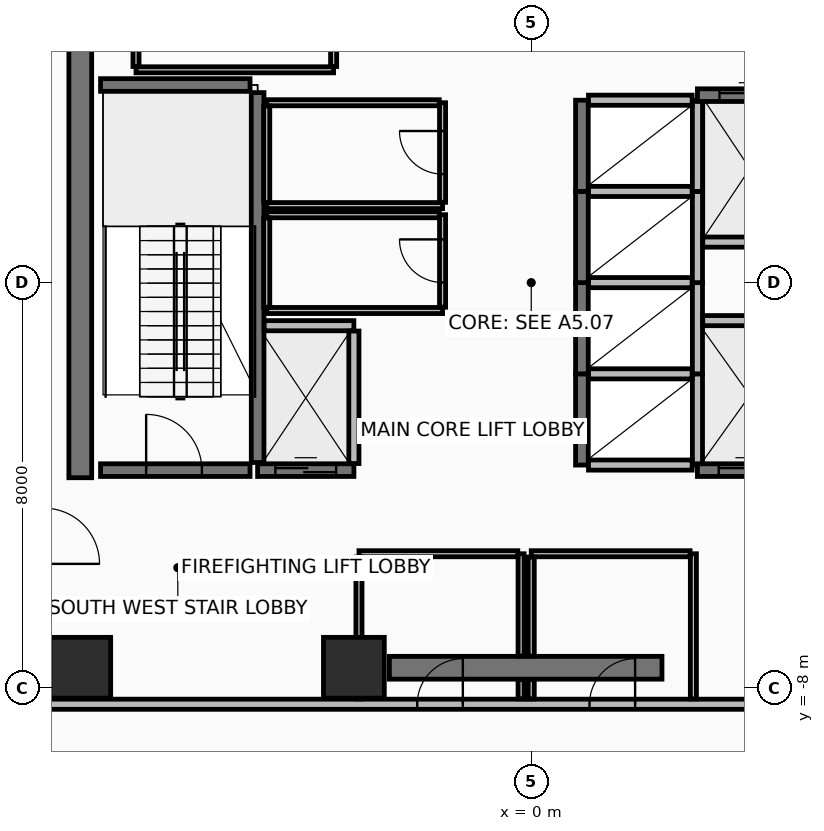
"""IFC4 building model, lengths in metres.
Left out: names, types, materials, properties, quantities, classifications, styles, units other than length and angle.
Written with IfcOpenShell. Run it as: python <this file> out.ifc"""

import sys

from ifc_helpers import new_model, si_unit, direction, frame, frame_2d, origin, origin_2d, place, context, subcontext, project, spatial, rectangle, extrude, element, fill, save


model = new_model("IFC4")
c1 = context("Model", 3, precision=1e-05, world=origin(), true_north=direction((0.0, 1.0)))
c2 = subcontext(c1, "Body", "Model", "MODEL_VIEW")
j1 = project(units=[si_unit("LENGTHUNIT", "METRE"), si_unit("PLANEANGLEUNIT", "RADIAN")], contexts=[c1])
p1 = place(None, origin())
s1 = spatial("IfcSite", under=j1, at=p1, CompositionType="ELEMENT")
p2 = place(p1, origin())
s2 = spatial("IfcBuilding", under=s1, at=p2, CompositionType="ELEMENT")
p3 = place(p2, frame((0.0, 0.0, 134.05)))
s3 = spatial("IfcBuildingStorey", under=s2, at=p3, CompositionType="ELEMENT", Elevation=134.05)
for number, where, z_axis, x_axis in (
    (1, (-8.9, -7.6, 0.0), (0.0, 0.0, 1.0), (1.0, 0.0, 0.0)),
    (2, (-3.5, -7.6, 0.0), (0.0, 0.0, 1.0), (1.0, 0.0, 0.0)),
):
    element("IfcColumn", number, at=place(p3, frame(where, z_axis=z_axis, x_axis=x_axis)), inside=s3, PredefinedType="COLUMN", context=c2, shape_type="SweptSolid", body=[
        extrude(rectangle(XDim=1.2, YDim=1.2, at=origin_2d()), origin(), (0.0, 0.0, 1.0), 4.75),
    ])
p4 = place(p3, frame((-2.8, -7.6, 0.0), z_axis=(0.0, 0.0, 1.0), x_axis=(1.0, 0.0, 0.0)))
e3 = element("IfcWall", 3, at=p4, inside=s3, PredefinedType="SHEAR", context=c2, shape_type="SweptSolid", body=[
    extrude(rectangle(XDim=5.38, YDim=0.45, at=frame_2d((2.69, 0.0))), origin(), (0.0, 0.0, 1.0), 4.56),
])
p5 = place(p3, frame((-8.9, -3.85, 0.0), z_axis=(0.0, 0.0, 1.0), x_axis=(0.0, 1.0, 0.0)))
e4 = element("IfcWall", 4, at=p5, inside=s3, PredefinedType="SHEAR", context=c2, shape_type="SweptSolid", body=[
    extrude(rectangle(XDim=10.7, YDim=0.45, at=frame_2d((5.35, 0.0))), origin(), (0.0, 0.0, 1.0), 4.56),
])
p6 = place(p3, frame((-9.62, -8.32, 0.0), z_axis=(0.0, 0.0, 1.0), x_axis=(1.0, 0.0, 0.0)))
e5 = element("IfcWall", 5, at=p6, inside=s3, PredefinedType="PARTITIONING", context=c2, shape_type="SweptSolid", body=[
    extrude(rectangle(XDim=19.24, YDim=0.2, at=frame_2d((9.62, 0.0))), origin(), (0.0, 0.0, 1.0), 2.355),
])
p7 = place(p6, frame((7.37, 0.0, 0.0)))
e6 = element("IfcOpeningElement", 6, at=p7, cuts=e5, PredefinedType="OPENING", context=c2, shape_type="SweptSolid", body=[
    extrude(rectangle(XDim=0.9, YDim=2.1, at=frame_2d((0.45, 1.05))), frame((0.0, 0.11, 0.0), z_axis=(0.0, -1.0, 0.0), x_axis=(1.0, 0.0, 0.0)), (0.0, 0.0, 1.0), 0.22),
])
p8 = place(p6, frame((10.77, 0.0, 0.0)))
e7 = element("IfcOpeningElement", 7, at=p8, cuts=e5, PredefinedType="OPENING", context=c2, shape_type="SweptSolid", body=[
    extrude(rectangle(XDim=0.9, YDim=2.1, at=frame_2d((0.45, 1.05))), frame((0.0, 0.11, 0.0), z_axis=(0.0, -1.0, 0.0), x_axis=(1.0, 0.0, 0.0)), (0.0, 0.0, 1.0), 0.22),
])
p9 = place(p3, frame((-5.4, -3.55, 0.0), z_axis=(0.0, 0.0, 1.0), x_axis=(0.0, 1.0, 0.0)))
e8 = element("IfcWall", 8, at=p9, inside=s3, PredefinedType="SHEAR", context=c2, shape_type="SweptSolid", body=[
    extrude(rectangle(XDim=7.3, YDim=0.25, at=frame_2d((3.65, 0.0))), origin(), (0.0, 0.0, 1.0), 4.56),
])
p10 = place(p3, frame((-8.5, -3.7, 0.0), z_axis=(0.0, 0.0, 1.0), x_axis=(1.0, 0.0, 0.0)))
e9 = element("IfcWall", 9, at=p10, inside=s3, PredefinedType="SHEAR", context=c2, shape_type="SweptSolid", body=[
    extrude(rectangle(XDim=2.95, YDim=0.25, at=frame_2d((1.475, 0.0))), origin(), (0.0, 0.0, 1.0), 4.56),
])
p11 = place(p10, frame((0.9, 0.0, 0.0)))
e10 = element("IfcOpeningElement", 10, at=p11, cuts=e9, PredefinedType="OPENING", context=c2, shape_type="SweptSolid", body=[
    extrude(rectangle(XDim=1.1, YDim=2.15, at=frame_2d((0.55, 1.075))), frame((0.0, 0.135, 0.0), z_axis=(0.0, -1.0, 0.0), x_axis=(1.0, 0.0, 0.0)), (0.0, 0.0, 1.0), 0.27),
])
p12 = place(p3, frame((-8.5, 3.9, 0.0), z_axis=(0.0, 0.0, 1.0), x_axis=(1.0, 0.0, 0.0)))
e11 = element("IfcWall", 11, at=p12, inside=s3, PredefinedType="SHEAR", context=c2, shape_type="SweptSolid", body=[
    extrude(rectangle(XDim=2.95, YDim=0.25, at=frame_2d((1.475, 0.0))), origin(), (0.0, 0.0, 1.0), 4.56),
])
p13 = place(p3, frame((1.0, -3.6, 0.0), z_axis=(0.0, 0.0, 1.0), x_axis=(0.0, 1.0, 0.0)))
e12 = element("IfcWall", 12, at=p13, inside=s3, PredefinedType="SHEAR", context=c2, shape_type="SweptSolid", body=[
    extrude(rectangle(XDim=1.8, YDim=0.25, at=frame_2d((0.9, 0.0))), origin(), (0.0, 0.0, 1.0), 4.56),
])
p14 = place(p3, frame((3.28, -3.6, 0.0), z_axis=(0.0, 0.0, 1.0), x_axis=(0.0, 1.0, 0.0)))
e13 = element("IfcWall", 13, at=p14, inside=s3, PredefinedType="PARTITIONING", context=c2, shape_type="SweptSolid", body=[
    extrude(rectangle(XDim=1.8, YDim=0.2, at=frame_2d((0.9, 0.0))), origin(), (0.0, 0.0, 1.0), 4.56),
])
for number, where, z_axis, x_axis in (
    (14, (1.13, -3.6, 0.0), (0.0, 0.0, 1.0), (1.0, 0.0, 0.0)),
    (15, (1.13, -1.8, 0.0), (0.0, 0.0, 1.0), (1.0, 0.0, 0.0)),
):
    element("IfcWall", number, at=place(p3, frame(where, z_axis=z_axis, x_axis=x_axis)), inside=s3, PredefinedType="PARTITIONING", context=c2, shape_type="SweptSolid", body=[
        extrude(rectangle(XDim=2.045, YDim=0.2, at=frame_2d((1.022, 0.0))), origin(), (0.0, 0.0, 1.0), 4.56),
    ])
p15 = place(p3, frame((1.0, -1.8, 0.0), z_axis=(0.0, 0.0, 1.0), x_axis=(0.0, 1.0, 0.0)))
e16 = element("IfcWall", 16, at=p15, inside=s3, PredefinedType="SHEAR", context=c2, shape_type="SweptSolid", body=[
    extrude(rectangle(XDim=1.8, YDim=0.25, at=frame_2d((0.9, 0.0))), origin(), (0.0, 0.0, 1.0), 4.56),
])
p16 = place(p3, frame((3.28, -1.8, 0.0), z_axis=(0.0, 0.0, 1.0), x_axis=(0.0, 1.0, 0.0)))
e17 = element("IfcWall", 17, at=p16, inside=s3, PredefinedType="PARTITIONING", context=c2, shape_type="SweptSolid", body=[
    extrude(rectangle(XDim=1.8, YDim=0.2, at=frame_2d((0.9, 0.0))), origin(), (0.0, 0.0, 1.0), 4.56),
])
p17 = place(p3, frame((1.13, 0.0, 0.0), z_axis=(0.0, 0.0, 1.0), x_axis=(1.0, 0.0, 0.0)))
e18 = element("IfcWall", 18, at=p17, inside=s3, PredefinedType="PARTITIONING", context=c2, shape_type="SweptSolid", body=[
    extrude(rectangle(XDim=2.045, YDim=0.2, at=frame_2d((1.022, 0.0))), origin(), (0.0, 0.0, 1.0), 4.56),
])
p18 = place(p3, frame((1.0, 0.0, 0.0), z_axis=(0.0, 0.0, 1.0), x_axis=(0.0, 1.0, 0.0)))
e19 = element("IfcWall", 19, at=p18, inside=s3, PredefinedType="SHEAR", context=c2, shape_type="SweptSolid", body=[
    extrude(rectangle(XDim=1.8, YDim=0.25, at=frame_2d((0.9, 0.0))), origin(), (0.0, 0.0, 1.0), 4.56),
])
p19 = place(p3, frame((3.28, 0.0, 0.0), z_axis=(0.0, 0.0, 1.0), x_axis=(0.0, 1.0, 0.0)))
e20 = element("IfcWall", 20, at=p19, inside=s3, PredefinedType="PARTITIONING", context=c2, shape_type="SweptSolid", body=[
    extrude(rectangle(XDim=1.8, YDim=0.2, at=frame_2d((0.9, 0.0))), origin(), (0.0, 0.0, 1.0), 4.56),
])
p20 = place(p3, frame((1.13, 1.8, 0.0), z_axis=(0.0, 0.0, 1.0), x_axis=(1.0, 0.0, 0.0)))
e21 = element("IfcWall", 21, at=p20, inside=s3, PredefinedType="PARTITIONING", context=c2, shape_type="SweptSolid", body=[
    extrude(rectangle(XDim=2.045, YDim=0.2, at=frame_2d((1.022, 0.0))), origin(), (0.0, 0.0, 1.0), 4.56),
])
p21 = place(p3, frame((1.0, 1.8, 0.0), z_axis=(0.0, 0.0, 1.0), x_axis=(0.0, 1.0, 0.0)))
e22 = element("IfcWall", 22, at=p21, inside=s3, PredefinedType="SHEAR", context=c2, shape_type="SweptSolid", body=[
    extrude(rectangle(XDim=1.8, YDim=0.25, at=frame_2d((0.9, 0.0))), origin(), (0.0, 0.0, 1.0), 4.56),
])
p22 = place(p3, frame((3.28, 1.8, 0.0), z_axis=(0.0, 0.0, 1.0), x_axis=(0.0, 1.0, 0.0)))
e23 = element("IfcWall", 23, at=p22, inside=s3, PredefinedType="PARTITIONING", context=c2, shape_type="SweptSolid", body=[
    extrude(rectangle(XDim=1.8, YDim=0.2, at=frame_2d((0.9, 0.0))), origin(), (0.0, 0.0, 1.0), 4.56),
])
p23 = place(p3, frame((1.13, 3.6, 0.0), z_axis=(0.0, 0.0, 1.0), x_axis=(1.0, 0.0, 0.0)))
e24 = element("IfcWall", 24, at=p23, inside=s3, PredefinedType="PARTITIONING", context=c2, shape_type="SweptSolid", body=[
    extrude(rectangle(XDim=2.045, YDim=0.2, at=frame_2d((1.022, 0.0))), origin(), (0.0, 0.0, 1.0), 3.755),
])
p24 = place(p3, frame((-5.4, -3.7, 0.0), z_axis=(0.0, 0.0, 1.0), x_axis=(1.0, 0.0, 0.0)))
e25 = element("IfcWall", 25, at=p24, inside=s3, PredefinedType="SHEAR", context=c2, shape_type="SweptSolid", body=[
    extrude(rectangle(XDim=1.9, YDim=0.25, at=frame_2d((0.95, 0.0))), origin(), (0.0, 0.0, 1.0), 4.56),
])
p25 = place(p24, frame((0.35, 0.0, 0.0)))
e26 = element("IfcOpeningElement", 26, at=p25, cuts=e25, PredefinedType="OPENING", context=c2, shape_type="SweptSolid", body=[
    extrude(rectangle(XDim=1.2, YDim=2.2, at=frame_2d((0.6, 1.1))), frame((0.0, 0.135, 0.0), z_axis=(0.0, -1.0, 0.0), x_axis=(1.0, 0.0, 0.0)), (0.0, 0.0, 1.0), 0.27),
])
p26 = place(p3, frame((-5.27, -0.85, 0.0), z_axis=(0.0, 0.0, 1.0), x_axis=(1.0, 0.0, 0.0)))
e27 = element("IfcWall", 27, at=p26, inside=s3, PredefinedType="PARTITIONING", context=c2, shape_type="SweptSolid", body=[
    extrude(rectangle(XDim=1.77, YDim=0.2, at=frame_2d((0.885, 0.0))), origin(), (0.0, 0.0, 1.0), 4.56),
])
p27 = place(p3, frame((-3.5, -3.57, 0.0), z_axis=(0.0, 0.0, 1.0), x_axis=(0.0, 1.0, 0.0)))
e28 = element("IfcWall", 28, at=p27, inside=s3, PredefinedType="PARTITIONING", context=c2, shape_type="SweptSolid", body=[
    extrude(rectangle(XDim=2.615, YDim=0.2, at=frame_2d((1.308, 0.0))), origin(), (0.0, 0.0, 1.0), 4.56),
])
p28 = place(p3, frame((3.28, 3.7, 0.0), z_axis=(0.0, 0.0, 1.0), x_axis=(1.0, 0.0, 0.0)))
e29 = element("IfcWall", 29, at=p28, inside=s3, PredefinedType="SHEAR", context=c2, shape_type="SweptSolid", body=[
    extrude(rectangle(XDim=2.07, YDim=0.25, at=frame_2d((1.035, 0.0))), origin(), (0.0, 0.0, 1.0), 4.56),
])
p29 = place(p28, frame((0.435, 0.0, 0.0)))
e30 = element("IfcOpeningElement", 30, at=p29, cuts=e29, PredefinedType="OPENING", context=c2, shape_type="SweptSolid", body=[
    extrude(rectangle(XDim=1.2, YDim=2.2, at=frame_2d((0.6, 1.1))), frame((0.0, 0.135, 0.0), z_axis=(0.0, -1.0, 0.0), x_axis=(1.0, 0.0, 0.0)), (0.0, 0.0, 1.0), 0.27),
])
p30 = place(p3, frame((3.385, 0.8, 0.0), z_axis=(0.0, 0.0, 1.0), x_axis=(1.0, 0.0, 0.0)))
e31 = element("IfcWall", 31, at=p30, inside=s3, PredefinedType="PARTITIONING", context=c2, shape_type="SweptSolid", body=[
    extrude(rectangle(XDim=1.835, YDim=0.2, at=frame_2d((0.917, 0.0))), origin(), (0.0, 0.0, 1.0), 4.56),
])
p31 = place(p3, frame((3.28, -3.7, 0.0), z_axis=(0.0, 0.0, 1.0), x_axis=(1.0, 0.0, 0.0)))
e32 = element("IfcWall", 32, at=p31, inside=s3, PredefinedType="SHEAR", context=c2, shape_type="SweptSolid", body=[
    extrude(rectangle(XDim=1.94, YDim=0.25, at=frame_2d((0.97, 0.0))), origin(), (0.0, 0.0, 1.0), 4.56),
])
p32 = place(p31, frame((0.42, 0.0, 0.0)))
e33 = element("IfcOpeningElement", 33, at=p32, cuts=e32, PredefinedType="OPENING", context=c2, shape_type="SweptSolid", body=[
    extrude(rectangle(XDim=1.1, YDim=2.2, at=frame_2d((0.55, 1.1))), frame((0.0, 0.135, 0.0), z_axis=(0.0, -1.0, 0.0), x_axis=(1.0, 0.0, 0.0)), (0.0, 0.0, 1.0), 0.27),
])
p33 = place(p3, frame((3.385, -0.75, 0.0), z_axis=(0.0, 0.0, 1.0), x_axis=(1.0, 0.0, 0.0)))
e34 = element("IfcWall", 34, at=p33, inside=s3, PredefinedType="PARTITIONING", context=c2, shape_type="SweptSolid", body=[
    extrude(rectangle(XDim=1.835, YDim=0.2, at=frame_2d((0.917, 0.0))), origin(), (0.0, 0.0, 1.0), 4.56),
])
p34 = place(p3, frame((-5.22, 1.52, 0.0), z_axis=(0.0, 0.0, 1.0), x_axis=(1.0, 0.0, 0.0)))
e35 = element("IfcWall", 35, at=p34, inside=s3, PredefinedType="PARTITIONING", context=c2, shape_type="SweptSolid", body=[
    extrude(rectangle(XDim=3.47, YDim=0.12, at=frame_2d((1.735, 0.0))), origin(), (0.0, 0.0, 1.0), 4.56),
])
p35 = place(p3, frame((-1.75, 1.585, 0.0), z_axis=(0.0, 0.0, 1.0), x_axis=(0.0, 1.0, 0.0)))
e36 = element("IfcWall", 36, at=p35, inside=s3, PredefinedType="PARTITIONING", context=c2, shape_type="SweptSolid", body=[
    extrude(rectangle(XDim=1.965, YDim=0.12, at=frame_2d((0.982, 0.0))), origin(), (0.0, 0.0, 1.0), 4.56),
])
p36 = place(p35, frame((0.557, 0.0, 0.0)))
e37 = element("IfcOpeningElement", 37, at=p36, cuts=e36, PredefinedType="OPENING", context=c2, shape_type="SweptSolid", body=[
    extrude(rectangle(XDim=0.85, YDim=2.1, at=frame_2d((0.425, 1.05))), frame((0.0, 0.07, 0.0), z_axis=(0.0, -1.0, 0.0), x_axis=(1.0, 0.0, 0.0)), (0.0, 0.0, 1.0), 0.14),
])
p37 = place(p3, frame((-1.815, 3.55, 0.0), z_axis=(0.0, 0.0, 1.0), x_axis=(-1.0, 0.0, 0.0)))
e38 = element("IfcWall", 38, at=p37, inside=s3, PredefinedType="PARTITIONING", context=c2, shape_type="SweptSolid", body=[
    extrude(rectangle(XDim=3.405, YDim=0.12, at=frame_2d((1.703, 0.0))), origin(), (0.0, 0.0, 1.0), 4.56),
])
p38 = place(p3, frame((-5.22, 3.485, 0.0), z_axis=(0.0, 0.0, 1.0), x_axis=(0.0, -1.0, 0.0)))
e39 = element("IfcWall", 39, at=p38, inside=s3, PredefinedType="PARTITIONING", context=c2, shape_type="SweptSolid", body=[
    extrude(rectangle(XDim=1.9, YDim=0.12, at=frame_2d((0.95, 0.0))), origin(), (0.0, 0.0, 1.0), 4.56),
])
p39 = place(p3, frame((-5.22, -0.55, 0.0), z_axis=(0.0, 0.0, 1.0), x_axis=(1.0, 0.0, 0.0)))
e40 = element("IfcWall", 40, at=p39, inside=s3, PredefinedType="PARTITIONING", context=c2, shape_type="SweptSolid", body=[
    extrude(rectangle(XDim=3.47, YDim=0.12, at=frame_2d((1.735, 0.0))), origin(), (0.0, 0.0, 1.0), 4.56),
])
p40 = place(p3, frame((-1.75, -0.485, 0.0), z_axis=(0.0, 0.0, 1.0), x_axis=(0.0, 1.0, 0.0)))
e41 = element("IfcWall", 41, at=p40, inside=s3, PredefinedType="PARTITIONING", context=c2, shape_type="SweptSolid", body=[
    extrude(rectangle(XDim=1.825, YDim=0.12, at=frame_2d((0.913, 0.0))), origin(), (0.0, 0.0, 1.0), 4.56),
])
p41 = place(p40, frame((0.488, 0.0, 0.0)))
e42 = element("IfcOpeningElement", 42, at=p41, cuts=e41, PredefinedType="OPENING", context=c2, shape_type="SweptSolid", body=[
    extrude(rectangle(XDim=0.85, YDim=2.1, at=frame_2d((0.425, 1.05))), frame((0.0, 0.07, 0.0), z_axis=(0.0, -1.0, 0.0), x_axis=(1.0, 0.0, 0.0)), (0.0, 0.0, 1.0), 0.14),
])
p42 = place(p3, frame((-1.815, 1.34, 0.0), z_axis=(0.0, 0.0, 1.0), x_axis=(-1.0, 0.0, 0.0)))
e43 = element("IfcWall", 43, at=p42, inside=s3, PredefinedType="PARTITIONING", context=c2, shape_type="SweptSolid", body=[
    extrude(rectangle(XDim=3.405, YDim=0.12, at=frame_2d((1.703, 0.0))), origin(), (0.0, 0.0, 1.0), 4.56),
])
p43 = place(p3, frame((-5.22, 1.275, 0.0), z_axis=(0.0, 0.0, 1.0), x_axis=(0.0, -1.0, 0.0)))
e44 = element("IfcWall", 44, at=p43, inside=s3, PredefinedType="PARTITIONING", context=c2, shape_type="SweptSolid", body=[
    extrude(rectangle(XDim=1.76, YDim=0.12, at=frame_2d((0.88, 0.0))), origin(), (0.0, 0.0, 1.0), 4.56),
])
p44 = place(p3, frame((-0.2, -8.215, 0.0), z_axis=(0.0, 0.0, 1.0), x_axis=(0.0, 1.0, 0.0)))
e45 = element("IfcWall", 45, at=p44, inside=s3, PredefinedType="PARTITIONING", context=c2, shape_type="SweptSolid", body=[
    extrude(rectangle(XDim=0.385, YDim=0.12, at=frame_2d((0.192, 0.0))), origin(), (0.0, 0.0, 1.0), 3.755),
])
p45 = place(p3, frame((-0.2, -7.37, 0.0), z_axis=(0.0, 0.0, 1.0), x_axis=(0.0, 1.0, 0.0)))
e46 = element("IfcWall", 46, at=p45, inside=s3, PredefinedType="PARTITIONING", context=c2, shape_type="SweptSolid", body=[
    extrude(rectangle(XDim=2.02, YDim=0.12, at=frame_2d((1.01, 0.0))), origin(), (0.0, 0.0, 1.0), 3.755),
])
p46 = place(p3, frame((-0.265, -5.35, 0.0), z_axis=(0.0, 0.0, 1.0), x_axis=(-1.0, 0.0, 0.0)))
e47 = element("IfcWall", 47, at=p46, inside=s3, PredefinedType="PARTITIONING", context=c2, shape_type="SweptSolid", body=[
    extrude(rectangle(XDim=3.135, YDim=0.12, at=frame_2d((1.567, 0.0))), origin(), (0.0, 0.0, 1.0), 3.755),
])
p47 = place(p3, frame((-3.4, -5.415, 0.0), z_axis=(0.0, 0.0, 1.0), x_axis=(0.0, -1.0, 0.0)))
e48 = element("IfcWall", 48, at=p47, inside=s3, PredefinedType="PARTITIONING", context=c2, shape_type="SweptSolid", body=[
    extrude(rectangle(XDim=2.8, YDim=0.12, at=frame_2d((1.4, 0.0))), origin(), (0.0, 0.0, 1.0), 2.355),
])
p48 = place(p3, frame((3.2, -8.215, 0.0), z_axis=(0.0, 0.0, 1.0), x_axis=(0.0, 1.0, 0.0)))
e49 = element("IfcWall", 49, at=p48, inside=s3, PredefinedType="PARTITIONING", context=c2, shape_type="SweptSolid", body=[
    extrude(rectangle(XDim=2.865, YDim=0.12, at=frame_2d((1.433, 0.0))), origin(), (0.0, 0.0, 1.0), 3.755),
])
p49 = place(p3, frame((3.135, -5.35, 0.0), z_axis=(0.0, 0.0, 1.0), x_axis=(-1.0, 0.0, 0.0)))
e50 = element("IfcWall", 50, at=p49, inside=s3, PredefinedType="PARTITIONING", context=c2, shape_type="SweptSolid", body=[
    extrude(rectangle(XDim=3.135, YDim=0.12, at=frame_2d((1.567, 0.0))), origin(), (0.0, 0.0, 1.0), 4.56),
])
p50 = place(p3, frame((0.0, -5.415, 0.0), z_axis=(0.0, 0.0, 1.0), x_axis=(0.0, -1.0, 0.0)))
e51 = element("IfcWall", 51, at=p50, inside=s3, PredefinedType="PARTITIONING", context=c2, shape_type="SweptSolid", body=[
    extrude(rectangle(XDim=1.955, YDim=0.12, at=frame_2d((0.978, 0.0))), origin(), (0.0, 0.0, 1.0), 3.755),
])
p51 = place(p3, frame((0.0, -7.83, 0.0), z_axis=(0.0, 0.0, 1.0), x_axis=(0.0, -1.0, 0.0)))
e52 = element("IfcWall", 52, at=p51, inside=s3, PredefinedType="PARTITIONING", context=c2, shape_type="SweptSolid", body=[
    extrude(rectangle(XDim=0.385, YDim=0.12, at=frame_2d((0.192, 0.0))), origin(), (0.0, 0.0, 1.0), 3.755),
])
p52 = place(p3, frame((-7.8, 4.2, 0.0), z_axis=(0.0, 0.0, 1.0), x_axis=(1.0, 0.0, 0.0)))
e53 = element("IfcWall", 53, at=p52, inside=s3, PredefinedType="PARTITIONING", context=c2, shape_type="SweptSolid", body=[
    extrude(rectangle(XDim=3.9, YDim=0.12, at=frame_2d((1.95, 0.0))), origin(), (0.0, 0.0, 1.0), 4.56),
])
for number, where, z_axis, x_axis in (
    (54, (-3.9, 4.265, 0.0), (0.0, 0.0, 1.0), (0.0, 1.0, 0.0)),
    (55, (-7.8, 8.215, 0.0), (0.0, 0.0, 1.0), (0.0, -1.0, 0.0)),
):
    element("IfcWall", number, at=place(p3, frame(where, z_axis=z_axis, x_axis=x_axis)), inside=s3, PredefinedType="PARTITIONING", context=c2, shape_type="SweptSolid", body=[
        extrude(rectangle(XDim=3.95, YDim=0.12, at=frame_2d((1.975, 0.0))), origin(), (0.0, 0.0, 1.0), 3.755),
    ])
p53 = place(p11, origin())
e56 = element("IfcDoor", 56, at=p53, inside=s3, OperationType="SINGLE_SWING_LEFT", PredefinedType="DOOR", context=c2, shape_type="SweptSolid", body=[
    extrude(rectangle(XDim=1.1, YDim=2.15, at=frame_2d((0.55, 1.075))), frame((0.0, 0.025, 0.0), z_axis=(0.0, -1.0, 0.0), x_axis=(1.0, 0.0, 0.0)), (0.0, 0.0, 1.0), 0.05),
])
fill(e10, e56)
p54 = place(p25, origin())
e57 = element("IfcDoor", 57, at=p54, inside=s3, OperationType="SLIDING_TO_RIGHT", PredefinedType="DOOR", context=c2, shape_type="SweptSolid", body=[
    extrude(rectangle(XDim=1.2, YDim=2.2, at=frame_2d((0.6, 1.1))), frame((0.0, 0.025, 0.0), z_axis=(0.0, -1.0, 0.0), x_axis=(1.0, 0.0, 0.0)), (0.0, 0.0, 1.0), 0.05),
])
fill(e26, e57)
p55 = place(p29, origin())
e58 = element("IfcDoor", 58, at=p55, inside=s3, OperationType="SLIDING_TO_RIGHT", PredefinedType="DOOR", context=c2, shape_type="SweptSolid", body=[
    extrude(rectangle(XDim=1.2, YDim=2.2, at=frame_2d((0.6, 1.1))), frame((0.0, 0.025, 0.0), z_axis=(0.0, -1.0, 0.0), x_axis=(1.0, 0.0, 0.0)), (0.0, 0.0, 1.0), 0.05),
])
fill(e30, e58)
p56 = place(p32, origin())
e59 = element("IfcDoor", 59, at=p56, inside=s3, OperationType="SLIDING_TO_LEFT", PredefinedType="DOOR", context=c2, shape_type="SweptSolid", body=[
    extrude(rectangle(XDim=1.1, YDim=2.2, at=frame_2d((0.55, 1.1))), frame((0.0, 0.025, 0.0), z_axis=(0.0, -1.0, 0.0), x_axis=(1.0, 0.0, 0.0)), (0.0, 0.0, 1.0), 0.05),
])
fill(e33, e59)
p57 = place(p36, frame((0.85, 0.0, 0.0), z_axis=(0.0, 0.0, 1.0), x_axis=(-1.0, 0.0, 0.0)))
e60 = element("IfcDoor", 60, at=p57, inside=s3, OperationType="SINGLE_SWING_RIGHT", PredefinedType="DOOR", context=c2, shape_type="SweptSolid", body=[
    extrude(rectangle(XDim=0.85, YDim=2.1, at=frame_2d((0.425, 1.05))), frame((0.0, 0.025, 0.0), z_axis=(0.0, -1.0, 0.0), x_axis=(1.0, 0.0, 0.0)), (0.0, 0.0, 1.0), 0.05),
])
fill(e37, e60)
p58 = place(p41, frame((0.85, 0.0, 0.0), z_axis=(0.0, 0.0, 1.0), x_axis=(-1.0, 0.0, 0.0)))
e61 = element("IfcDoor", 61, at=p58, inside=s3, OperationType="SINGLE_SWING_RIGHT", PredefinedType="DOOR", context=c2, shape_type="SweptSolid", body=[
    extrude(rectangle(XDim=0.85, YDim=2.1, at=frame_2d((0.425, 1.05))), frame((0.0, 0.025, 0.0), z_axis=(0.0, -1.0, 0.0), x_axis=(1.0, 0.0, 0.0)), (0.0, 0.0, 1.0), 0.05),
])
fill(e42, e61)
p59 = place(p7, frame((0.9, 0.0, 0.0), z_axis=(0.0, 0.0, 1.0), x_axis=(-1.0, 0.0, 0.0)))
e62 = element("IfcDoor", 62, at=p59, inside=s3, OperationType="SINGLE_SWING_LEFT", PredefinedType="DOOR", context=c2, shape_type="SweptSolid", body=[
    extrude(rectangle(XDim=0.9, YDim=2.1, at=frame_2d((0.45, 1.05))), frame((0.0, 0.025, 0.0), z_axis=(0.0, -1.0, 0.0), x_axis=(1.0, 0.0, 0.0)), (0.0, 0.0, 1.0), 0.05),
])
fill(e6, e62)
p60 = place(p8, frame((0.9, 0.0, 0.0), z_axis=(0.0, 0.0, 1.0), x_axis=(-1.0, 0.0, 0.0)))
e63 = element("IfcDoor", 63, at=p60, inside=s3, OperationType="SINGLE_SWING_LEFT", PredefinedType="DOOR", context=c2, shape_type="SweptSolid", body=[
    extrude(rectangle(XDim=0.9, YDim=2.1, at=frame_2d((0.45, 1.05))), frame((0.0, 0.025, 0.0), z_axis=(0.0, -1.0, 0.0), x_axis=(1.0, 0.0, 0.0)), (0.0, 0.0, 1.0), 0.05),
])
fill(e7, e63)
save(model, sys.argv[1])
